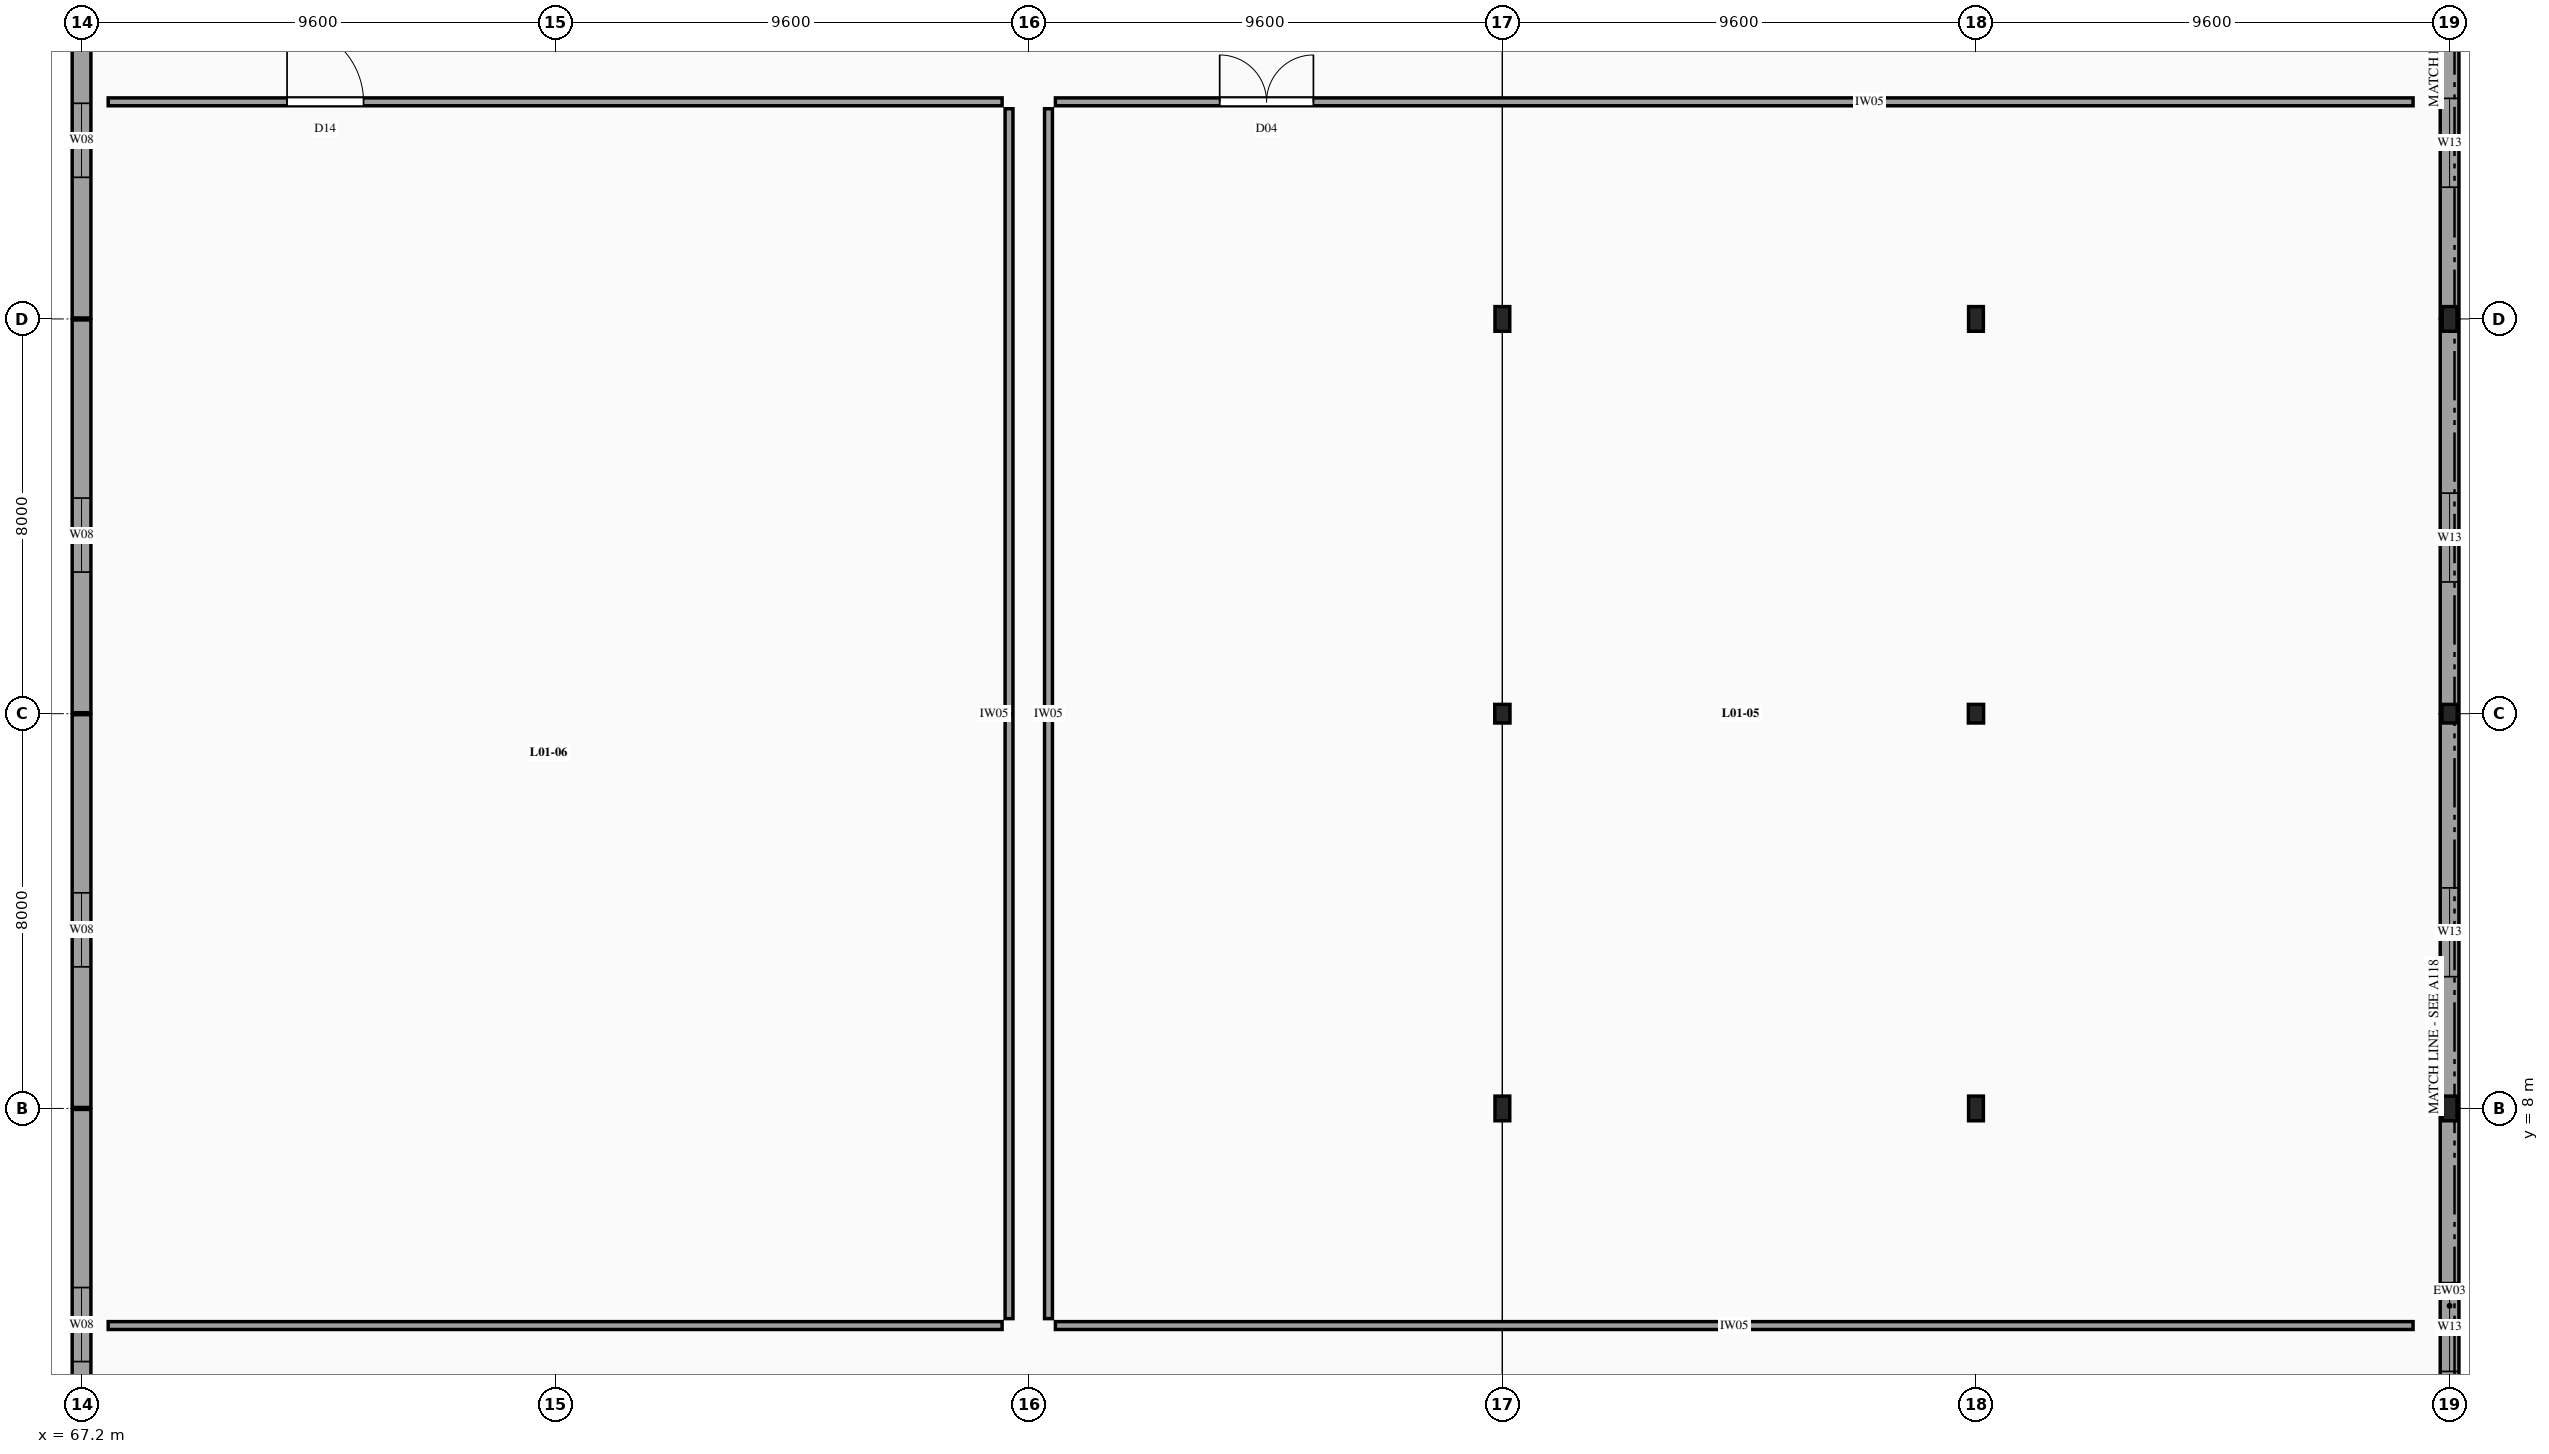
"""IFC4 building model, lengths in metres.
Left out: names, types, materials, properties, quantities, classifications, styles, units other than length and angle.
Written with IfcOpenShell. Run it as: python <this file> out.ifc"""

import sys

from ifc_helpers import new_model, si_unit, direction, frame, frame_2d, origin, origin_2d, place, context, subcontext, project, spatial, rectangle, i_section, extrude, element, fill, save


model = new_model("IFC4")
c1 = context("Model", 3, precision=1e-05, world=origin(), true_north=direction((0.0, 1.0)))
c2 = subcontext(c1, "Body", "Model", "MODEL_VIEW")
j1 = project(units=[si_unit("LENGTHUNIT", "METRE"), si_unit("PLANEANGLEUNIT", "RADIAN")], contexts=[c1])
p1 = place(None, origin())
s1 = spatial("IfcSite", under=j1, at=p1, CompositionType="ELEMENT")
p2 = place(p1, origin())
s2 = spatial("IfcBuilding", under=s1, at=p2, CompositionType="ELEMENT")
p3 = place(p2, frame((0.0, 0.0, 4.5)))
s3 = spatial("IfcBuildingStorey", under=s2, at=p3, CompositionType="ELEMENT", Elevation=4.5)
p4 = place(p3, frame((96.0, 8.0, -0.26), z_axis=(0.0, 0.0, 1.0), x_axis=(1.0, 0.0, 0.0)))
e1 = element("IfcColumn", 1, at=p4, inside=s3, PredefinedType="COLUMN", context=c2, shape_type="SweptSolid", body=[
    extrude(i_section(OverallWidth=0.3, OverallDepth=0.5, WebThickness=0.014, FlangeThickness=0.028, FilletRadius=0.027, at=origin_2d()), origin(), (0.0, 0.0, 1.0), 4.2),
])
p5 = place(p3, frame((96.0, 16.0, -0.26), z_axis=(0.0, 0.0, 1.0), x_axis=(1.0, 0.0, 0.0)))
e2 = element("IfcColumn", 2, at=p5, inside=s3, PredefinedType="COLUMN", context=c2, shape_type="SweptSolid", body=[
    extrude(i_section(OverallWidth=0.309, OverallDepth=0.377, WebThickness=0.021, FlangeThickness=0.04, FilletRadius=0.027, at=origin_2d()), origin(), (0.0, 0.0, 1.0), 4.2),
])
for number, where, z_axis, x_axis in (
    (3, (96.0, 24.0, -0.26), (0.0, 0.0, 1.0), (1.0, 0.0, 0.0)),
    (4, (105.6, 8.0, -0.26), (0.0, 0.0, 1.0), (1.0, 0.0, 0.0)),
):
    element("IfcColumn", number, at=place(p3, frame(where, z_axis=z_axis, x_axis=x_axis)), inside=s3, PredefinedType="COLUMN", context=c2, shape_type="SweptSolid", body=[
        extrude(i_section(OverallWidth=0.3, OverallDepth=0.5, WebThickness=0.014, FlangeThickness=0.028, FilletRadius=0.027, at=origin_2d()), origin(), (0.0, 0.0, 1.0), 4.2),
    ])
p6 = place(p3, frame((105.6, 16.0, -0.26), z_axis=(0.0, 0.0, 1.0), x_axis=(1.0, 0.0, 0.0)))
e5 = element("IfcColumn", 5, at=p6, inside=s3, PredefinedType="COLUMN", context=c2, shape_type="SweptSolid", body=[
    extrude(i_section(OverallWidth=0.309, OverallDepth=0.377, WebThickness=0.021, FlangeThickness=0.04, FilletRadius=0.027, at=origin_2d()), origin(), (0.0, 0.0, 1.0), 4.2),
])
for number, where, z_axis, x_axis in (
    (6, (105.6, 24.0, -0.26), (0.0, 0.0, 1.0), (1.0, 0.0, 0.0)),
    (7, (115.2, 8.0, -0.26), (0.0, 0.0, 1.0), (1.0, 0.0, 0.0)),
):
    element("IfcColumn", number, at=place(p3, frame(where, z_axis=z_axis, x_axis=x_axis)), inside=s3, PredefinedType="COLUMN", context=c2, shape_type="SweptSolid", body=[
        extrude(i_section(OverallWidth=0.3, OverallDepth=0.5, WebThickness=0.014, FlangeThickness=0.028, FilletRadius=0.027, at=origin_2d()), origin(), (0.0, 0.0, 1.0), 4.2),
    ])
p7 = place(p3, frame((115.2, 16.0, -0.26), z_axis=(0.0, 0.0, 1.0), x_axis=(1.0, 0.0, 0.0)))
e8 = element("IfcColumn", 8, at=p7, inside=s3, PredefinedType="COLUMN", context=c2, shape_type="SweptSolid", body=[
    extrude(i_section(OverallWidth=0.309, OverallDepth=0.377, WebThickness=0.021, FlangeThickness=0.04, FilletRadius=0.027, at=origin_2d()), origin(), (0.0, 0.0, 1.0), 4.2),
])
p8 = place(p3, frame((115.2, 24.0, -0.26), z_axis=(0.0, 0.0, 1.0), x_axis=(1.0, 0.0, 0.0)))
e9 = element("IfcColumn", 9, at=p8, inside=s3, PredefinedType="COLUMN", context=c2, shape_type="SweptSolid", body=[
    extrude(i_section(OverallWidth=0.3, OverallDepth=0.5, WebThickness=0.014, FlangeThickness=0.028, FilletRadius=0.027, at=origin_2d()), origin(), (0.0, 0.0, 1.0), 4.2),
])
p9 = place(p3, frame((67.2, 0.02, 0.0), z_axis=(0.0, 0.0, 1.0), x_axis=(0.0, 1.0, 0.0)))
e10 = element("IfcWall", 10, at=p9, inside=s3, PredefinedType="SOLIDWALL", context=c2, shape_type="SweptSolid", body=[
    extrude(rectangle(XDim=7.96, YDim=0.38, at=frame_2d((3.98, 0.0))), origin(), (0.0, 0.0, 1.0), 3.26),
])
p10 = place(p9, frame((2.85, 0.0, 0.8)))
e11 = element("IfcOpeningElement", 11, at=p10, cuts=e10, PredefinedType="OPENING", context=c2, shape_type="SweptSolid", body=[
    extrude(rectangle(XDim=1.5, YDim=2.2, at=frame_2d((0.75, 1.1))), frame((0.0, 0.2, 0.0), z_axis=(0.0, -1.0, 0.0), x_axis=(1.0, 0.0, 0.0)), (0.0, 0.0, 1.0), 0.4),
])
p11 = place(p3, frame((115.2, 0.02, 0.0), z_axis=(0.0, 0.0, 1.0), x_axis=(0.0, 1.0, 0.0)))
e12 = element("IfcWall", 12, at=p11, inside=s3, PredefinedType="SOLIDWALL", context=c2, shape_type="SweptSolid", body=[
    extrude(rectangle(XDim=7.96, YDim=0.38, at=frame_2d((3.98, 0.0))), origin(), (0.0, 0.0, 1.0), 3.26),
])
p12 = place(p11, frame((2.65, 0.0, 0.72)))
e13 = element("IfcOpeningElement", 13, at=p12, cuts=e12, PredefinedType="OPENING", context=c2, shape_type="SweptSolid", body=[
    extrude(rectangle(XDim=1.8, YDim=1.6, at=frame_2d((0.9, 0.8))), frame((0.0, 0.2, 0.0), z_axis=(0.0, -1.0, 0.0), x_axis=(1.0, 0.0, 0.0)), (0.0, 0.0, 1.0), 0.4),
])
p13 = place(p3, frame((67.2, 8.02, 0.0), z_axis=(0.0, 0.0, 1.0), x_axis=(0.0, 1.0, 0.0)))
e14 = element("IfcWall", 14, at=p13, inside=s3, PredefinedType="SOLIDWALL", context=c2, shape_type="SweptSolid", body=[
    extrude(rectangle(XDim=7.96, YDim=0.38, at=frame_2d((3.98, 0.0))), origin(), (0.0, 0.0, 1.0), 3.26),
])
p14 = place(p13, frame((2.85, 0.0, 0.8)))
e15 = element("IfcOpeningElement", 15, at=p14, cuts=e14, PredefinedType="OPENING", context=c2, shape_type="SweptSolid", body=[
    extrude(rectangle(XDim=1.5, YDim=2.2, at=frame_2d((0.75, 1.1))), frame((0.0, 0.2, 0.0), z_axis=(0.0, -1.0, 0.0), x_axis=(1.0, 0.0, 0.0)), (0.0, 0.0, 1.0), 0.4),
])
p15 = place(p3, frame((115.2, 8.02, 0.0), z_axis=(0.0, 0.0, 1.0), x_axis=(0.0, 1.0, 0.0)))
e16 = element("IfcWall", 16, at=p15, inside=s3, PredefinedType="SOLIDWALL", context=c2, shape_type="SweptSolid", body=[
    extrude(rectangle(XDim=7.96, YDim=0.38, at=frame_2d((3.98, 0.0))), origin(), (0.0, 0.0, 1.0), 3.26),
])
p16 = place(p15, frame((2.65, 0.0, 0.72)))
e17 = element("IfcOpeningElement", 17, at=p16, cuts=e16, PredefinedType="OPENING", context=c2, shape_type="SweptSolid", body=[
    extrude(rectangle(XDim=1.8, YDim=1.6, at=frame_2d((0.9, 0.8))), frame((0.0, 0.2, 0.0), z_axis=(0.0, -1.0, 0.0), x_axis=(1.0, 0.0, 0.0)), (0.0, 0.0, 1.0), 0.4),
])
p17 = place(p3, frame((67.2, 16.02, 0.0), z_axis=(0.0, 0.0, 1.0), x_axis=(0.0, 1.0, 0.0)))
e18 = element("IfcWall", 18, at=p17, inside=s3, PredefinedType="SOLIDWALL", context=c2, shape_type="SweptSolid", body=[
    extrude(rectangle(XDim=7.96, YDim=0.38, at=frame_2d((3.98, 0.0))), origin(), (0.0, 0.0, 1.0), 3.26),
])
p18 = place(p17, frame((2.85, 0.0, 0.8)))
e19 = element("IfcOpeningElement", 19, at=p18, cuts=e18, PredefinedType="OPENING", context=c2, shape_type="SweptSolid", body=[
    extrude(rectangle(XDim=1.5, YDim=2.2, at=frame_2d((0.75, 1.1))), frame((0.0, 0.2, 0.0), z_axis=(0.0, -1.0, 0.0), x_axis=(1.0, 0.0, 0.0)), (0.0, 0.0, 1.0), 0.4),
])
p19 = place(p3, frame((115.2, 16.02, 0.0), z_axis=(0.0, 0.0, 1.0), x_axis=(0.0, 1.0, 0.0)))
e20 = element("IfcWall", 20, at=p19, inside=s3, PredefinedType="SOLIDWALL", context=c2, shape_type="SweptSolid", body=[
    extrude(rectangle(XDim=7.96, YDim=0.38, at=frame_2d((3.98, 0.0))), origin(), (0.0, 0.0, 1.0), 3.26),
])
p20 = place(p19, frame((2.65, 0.0, 0.72)))
e21 = element("IfcOpeningElement", 21, at=p20, cuts=e20, PredefinedType="OPENING", context=c2, shape_type="SweptSolid", body=[
    extrude(rectangle(XDim=1.8, YDim=1.6, at=frame_2d((0.9, 0.8))), frame((0.0, 0.2, 0.0), z_axis=(0.0, -1.0, 0.0), x_axis=(1.0, 0.0, 0.0)), (0.0, 0.0, 1.0), 0.4),
])
p21 = place(p3, frame((67.2, 24.02, 0.0), z_axis=(0.0, 0.0, 1.0), x_axis=(0.0, 1.0, 0.0)))
e22 = element("IfcWall", 22, at=p21, inside=s3, PredefinedType="SOLIDWALL", context=c2, shape_type="SweptSolid", body=[
    extrude(rectangle(XDim=7.96, YDim=0.38, at=frame_2d((3.98, 0.0))), origin(), (0.0, 0.0, 1.0), 3.26),
])
p22 = place(p21, frame((2.85, 0.0, 0.8)))
e23 = element("IfcOpeningElement", 23, at=p22, cuts=e22, PredefinedType="OPENING", context=c2, shape_type="SweptSolid", body=[
    extrude(rectangle(XDim=1.5, YDim=2.2, at=frame_2d((0.75, 1.1))), frame((0.0, 0.2, 0.0), z_axis=(0.0, -1.0, 0.0), x_axis=(1.0, 0.0, 0.0)), (0.0, 0.0, 1.0), 0.4),
])
p23 = place(p3, frame((115.2, 24.02, 0.0), z_axis=(0.0, 0.0, 1.0), x_axis=(0.0, 1.0, 0.0)))
e24 = element("IfcWall", 24, at=p23, inside=s3, PredefinedType="SOLIDWALL", context=c2, shape_type="SweptSolid", body=[
    extrude(rectangle(XDim=7.96, YDim=0.38, at=frame_2d((3.98, 0.0))), origin(), (0.0, 0.0, 1.0), 3.26),
])
p24 = place(p23, frame((2.65, 0.0, 0.72)))
e25 = element("IfcOpeningElement", 25, at=p24, cuts=e24, PredefinedType="OPENING", context=c2, shape_type="SweptSolid", body=[
    extrude(rectangle(XDim=1.8, YDim=1.6, at=frame_2d((0.9, 0.8))), frame((0.0, 0.2, 0.0), z_axis=(0.0, -1.0, 0.0), x_axis=(1.0, 0.0, 0.0)), (0.0, 0.0, 1.0), 0.4),
])
p25 = place(p3, frame((86.94, 28.4, 0.0), z_axis=(0.0, 0.0, 1.0), x_axis=(1.0, 0.0, 0.0)))
e26 = element("IfcWall", 26, at=p25, inside=s3, PredefinedType="PARTITIONING", context=c2, shape_type="SweptSolid", body=[
    extrude(rectangle(XDim=27.52, YDim=0.16, at=frame_2d((13.76, 0.0))), origin(), (0.0, 0.0, 1.0), 3.1),
])
p26 = place(p25, frame((3.33, 0.0, 0.0)))
e27 = element("IfcOpeningElement", 27, at=p26, cuts=e26, PredefinedType="OPENING", context=c2, shape_type="SweptSolid", body=[
    extrude(rectangle(XDim=1.9, YDim=2.4, at=frame_2d((0.95, 1.2))), frame((0.0, 0.09, 0.0), z_axis=(0.0, -1.0, 0.0), x_axis=(1.0, 0.0, 0.0)), (0.0, 0.0, 1.0), 0.18),
])
p27 = place(p3, frame((86.94, 3.6, 0.0), z_axis=(0.0, 0.0, 1.0), x_axis=(1.0, 0.0, 0.0)))
e28 = element("IfcWall", 28, at=p27, inside=s3, PredefinedType="PARTITIONING", context=c2, shape_type="SweptSolid", body=[
    extrude(rectangle(XDim=27.52, YDim=0.16, at=frame_2d((13.76, 0.0))), origin(), (0.0, 0.0, 1.0), 3.1),
])
p28 = place(p3, frame((86.8, 3.74, 0.0), z_axis=(0.0, 0.0, 1.0), x_axis=(0.0, 1.0, 0.0)))
e29 = element("IfcWall", 29, at=p28, inside=s3, PredefinedType="PARTITIONING", context=c2, shape_type="SweptSolid", body=[
    extrude(rectangle(XDim=24.52, YDim=0.16, at=frame_2d((12.26, 0.0))), origin(), (0.0, 0.0, 1.0), 3.1),
])
p29 = place(p3, frame((67.74, 28.4, 0.0), z_axis=(0.0, 0.0, 1.0), x_axis=(1.0, 0.0, 0.0)))
e30 = element("IfcWall", 30, at=p29, inside=s3, PredefinedType="PARTITIONING", context=c2, shape_type="SweptSolid", body=[
    extrude(rectangle(XDim=18.12, YDim=0.16, at=frame_2d((9.06, 0.0))), origin(), (0.0, 0.0, 1.0), 3.1),
])
p30 = place(p29, frame((3.626, 0.0, 0.0)))
e31 = element("IfcOpeningElement", 31, at=p30, cuts=e30, PredefinedType="OPENING", context=c2, shape_type="SweptSolid", body=[
    extrude(rectangle(XDim=1.55, YDim=2.3, at=frame_2d((0.775, 1.15))), frame((0.0, 0.09, 0.0), z_axis=(0.0, -1.0, 0.0), x_axis=(1.0, 0.0, 0.0)), (0.0, 0.0, 1.0), 0.18),
])
p31 = place(p3, frame((67.74, 3.6, 0.0), z_axis=(0.0, 0.0, 1.0), x_axis=(1.0, 0.0, 0.0)))
e32 = element("IfcWall", 32, at=p31, inside=s3, PredefinedType="PARTITIONING", context=c2, shape_type="SweptSolid", body=[
    extrude(rectangle(XDim=18.12, YDim=0.16, at=frame_2d((9.06, 0.0))), origin(), (0.0, 0.0, 1.0), 3.1),
])
p32 = place(p3, frame((86.0, 3.74, 0.0), z_axis=(0.0, 0.0, 1.0), x_axis=(0.0, 1.0, 0.0)))
e33 = element("IfcWall", 33, at=p32, inside=s3, PredefinedType="PARTITIONING", context=c2, shape_type="SweptSolid", body=[
    extrude(rectangle(XDim=24.52, YDim=0.16, at=frame_2d((12.26, 0.0))), origin(), (0.0, 0.0, 1.0), 3.1),
])
p33 = place(p10, origin())
e34 = element("IfcWindow", 34, at=p33, inside=s3, PartitioningType="SINGLE_PANEL", PredefinedType="WINDOW", context=c2, shape_type="SweptSolid", body=[
    extrude(rectangle(XDim=1.5, YDim=2.2, at=frame_2d((0.75, 1.1))), frame((0.0, 0.03, 0.0), z_axis=(0.0, -1.0, 0.0), x_axis=(1.0, 0.0, 0.0)), (0.0, 0.0, 1.0), 0.06),
])
fill(e11, e34)
p34 = place(p12, origin())
e35 = element("IfcWindow", 35, at=p34, inside=s3, PartitioningType="SINGLE_PANEL", PredefinedType="WINDOW", context=c2, shape_type="SweptSolid", body=[
    extrude(rectangle(XDim=1.8, YDim=1.6, at=frame_2d((0.9, 0.8))), frame((0.0, 0.03, 0.0), z_axis=(0.0, -1.0, 0.0), x_axis=(1.0, 0.0, 0.0)), (0.0, 0.0, 1.0), 0.06),
])
fill(e13, e35)
p35 = place(p14, origin())
e36 = element("IfcWindow", 36, at=p35, inside=s3, PartitioningType="SINGLE_PANEL", PredefinedType="WINDOW", context=c2, shape_type="SweptSolid", body=[
    extrude(rectangle(XDim=1.5, YDim=2.2, at=frame_2d((0.75, 1.1))), frame((0.0, 0.03, 0.0), z_axis=(0.0, -1.0, 0.0), x_axis=(1.0, 0.0, 0.0)), (0.0, 0.0, 1.0), 0.06),
])
fill(e15, e36)
p36 = place(p16, origin())
e37 = element("IfcWindow", 37, at=p36, inside=s3, PartitioningType="SINGLE_PANEL", PredefinedType="WINDOW", context=c2, shape_type="SweptSolid", body=[
    extrude(rectangle(XDim=1.8, YDim=1.6, at=frame_2d((0.9, 0.8))), frame((0.0, 0.03, 0.0), z_axis=(0.0, -1.0, 0.0), x_axis=(1.0, 0.0, 0.0)), (0.0, 0.0, 1.0), 0.06),
])
fill(e17, e37)
p37 = place(p18, origin())
e38 = element("IfcWindow", 38, at=p37, inside=s3, PartitioningType="SINGLE_PANEL", PredefinedType="WINDOW", context=c2, shape_type="SweptSolid", body=[
    extrude(rectangle(XDim=1.5, YDim=2.2, at=frame_2d((0.75, 1.1))), frame((0.0, 0.03, 0.0), z_axis=(0.0, -1.0, 0.0), x_axis=(1.0, 0.0, 0.0)), (0.0, 0.0, 1.0), 0.06),
])
fill(e19, e38)
p38 = place(p20, origin())
e39 = element("IfcWindow", 39, at=p38, inside=s3, PartitioningType="SINGLE_PANEL", PredefinedType="WINDOW", context=c2, shape_type="SweptSolid", body=[
    extrude(rectangle(XDim=1.8, YDim=1.6, at=frame_2d((0.9, 0.8))), frame((0.0, 0.03, 0.0), z_axis=(0.0, -1.0, 0.0), x_axis=(1.0, 0.0, 0.0)), (0.0, 0.0, 1.0), 0.06),
])
fill(e21, e39)
p39 = place(p22, origin())
e40 = element("IfcWindow", 40, at=p39, inside=s3, PartitioningType="SINGLE_PANEL", PredefinedType="WINDOW", context=c2, shape_type="SweptSolid", body=[
    extrude(rectangle(XDim=1.5, YDim=2.2, at=frame_2d((0.75, 1.1))), frame((0.0, 0.03, 0.0), z_axis=(0.0, -1.0, 0.0), x_axis=(1.0, 0.0, 0.0)), (0.0, 0.0, 1.0), 0.06),
])
fill(e23, e40)
p40 = place(p24, origin())
e41 = element("IfcWindow", 41, at=p40, inside=s3, PartitioningType="SINGLE_PANEL", PredefinedType="WINDOW", context=c2, shape_type="SweptSolid", body=[
    extrude(rectangle(XDim=1.8, YDim=1.6, at=frame_2d((0.9, 0.8))), frame((0.0, 0.03, 0.0), z_axis=(0.0, -1.0, 0.0), x_axis=(1.0, 0.0, 0.0)), (0.0, 0.0, 1.0), 0.06),
])
fill(e25, e41)
p41 = place(p26, origin())
e42 = element("IfcDoor", 42, at=p41, inside=s3, OperationType="DOUBLE_DOOR_SINGLE_SWING", PredefinedType="DOOR", context=c2, shape_type="SweptSolid", body=[
    extrude(rectangle(XDim=1.9, YDim=2.4, at=frame_2d((0.95, 1.2))), frame((0.0, 0.025, 0.0), z_axis=(0.0, -1.0, 0.0), x_axis=(1.0, 0.0, 0.0)), (0.0, 0.0, 1.0), 0.05),
])
fill(e27, e42)
p42 = place(p30, origin())
e43 = element("IfcDoor", 43, at=p42, inside=s3, OperationType="SINGLE_SWING_LEFT", PredefinedType="DOOR", context=c2, shape_type="SweptSolid", body=[
    extrude(rectangle(XDim=1.55, YDim=2.3, at=frame_2d((0.775, 1.15))), frame((0.0, 0.025, 0.0), z_axis=(0.0, -1.0, 0.0), x_axis=(1.0, 0.0, 0.0)), (0.0, 0.0, 1.0), 0.05),
])
fill(e31, e43)
save(model, sys.argv[1])
